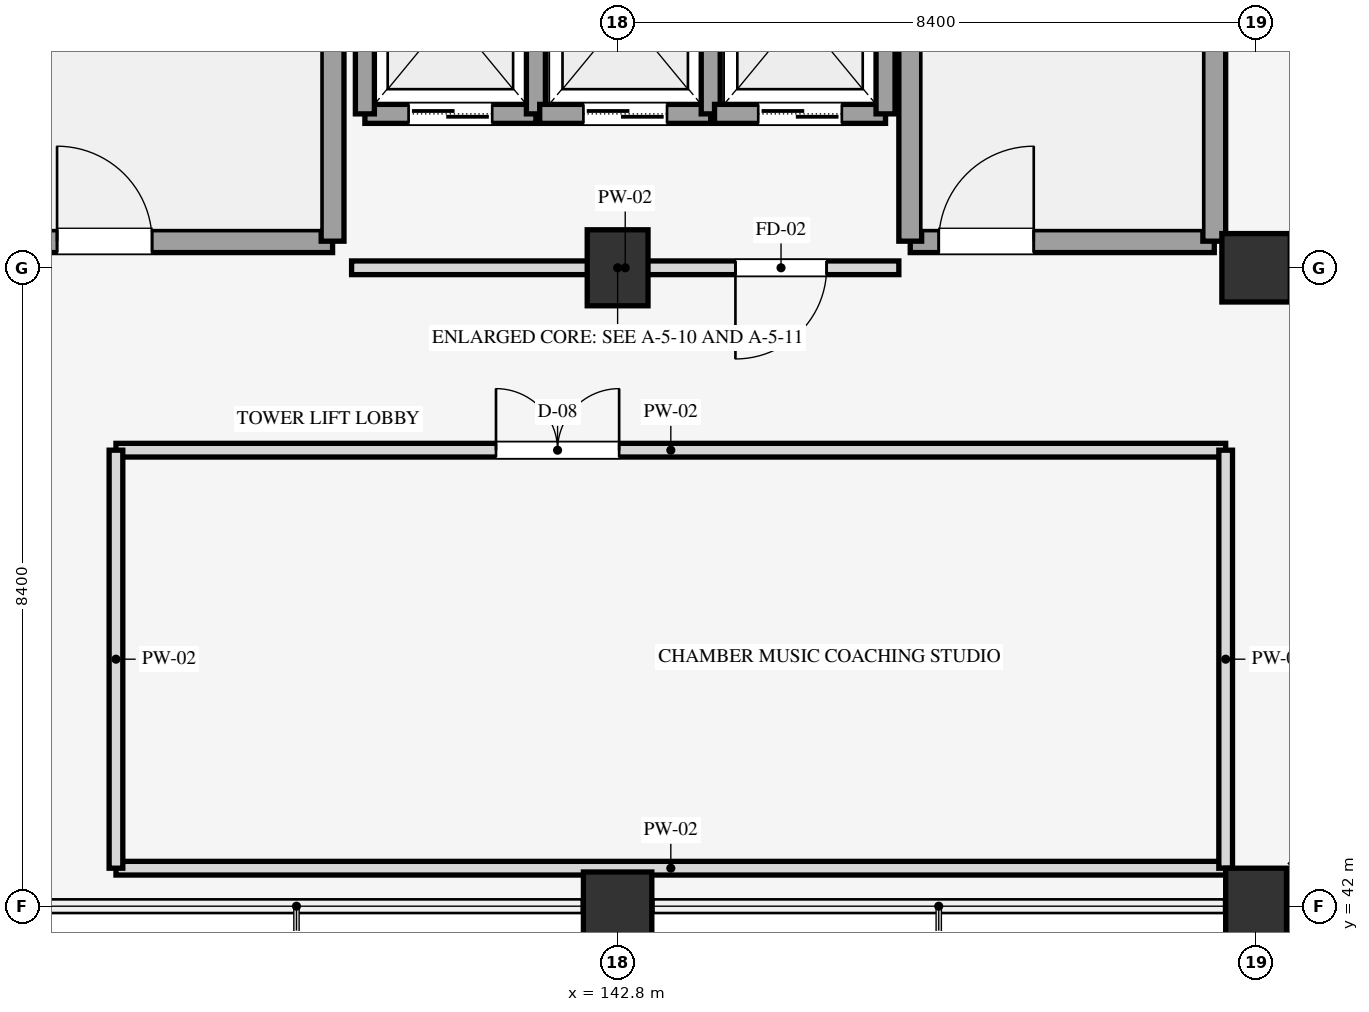
"""IFC4 building model, lengths in metres.
Left out: names, types, materials, properties, quantities, classifications, styles, units other than length and angle.
Written with IfcOpenShell. Run it as: python <this file> out.ifc"""

import sys

from ifc_helpers import new_model, si_unit, direction, frame, frame_2d, origin, origin_2d, place, context, subcontext, project, spatial, rectangle, extrude, element, fill, save


model = new_model("IFC4")
c1 = context("Model", 3, precision=1e-05, world=origin(), true_north=direction((0.0, 1.0)))
c2 = subcontext(c1, "Body", "Model", "MODEL_VIEW")
j1 = project(units=[si_unit("LENGTHUNIT", "METRE"), si_unit("PLANEANGLEUNIT", "RADIAN")], contexts=[c1])
p1 = place(None, origin())
s1 = spatial("IfcSite", under=j1, at=p1, CompositionType="ELEMENT")
p2 = place(p1, origin())
s2 = spatial("IfcBuilding", under=s1, at=p2, CompositionType="ELEMENT")
p3 = place(p2, frame((0.0, 0.0, 65.7)))
s3 = spatial("IfcBuildingStorey", under=s2, at=p3, CompositionType="ELEMENT", Elevation=65.7)
p4 = place(p3, frame((142.8, 42.0, 0.0), z_axis=(0.0, 0.0, 1.0), x_axis=(1.0, 0.0, 0.0)))
e1 = element("IfcColumn", 1, at=p4, inside=s3, PredefinedType="COLUMN", context=c2, shape_type="SweptSolid", body=[
    extrude(rectangle(XDim=0.9, YDim=0.9, at=origin_2d()), origin(), (0.0, 0.0, 1.0), 4.2),
])
for number, where, z_axis, x_axis in (
    (2, (142.8, 50.4, 0.0), (0.0, 0.0, 1.0), (1.0, 0.0, 0.0)),
    (3, (151.2, 42.0, 0.0), (0.0, 0.0, 1.0), (1.0, 0.0, 0.0)),
):
    element("IfcColumn", number, at=place(p3, frame(where, z_axis=z_axis, x_axis=x_axis)), inside=s3, PredefinedType="COLUMN", context=c2, shape_type="SweptSolid", body=[
        extrude(rectangle(XDim=0.8, YDim=1.0, at=origin_2d()), origin(), (0.0, 0.0, 1.0), 4.2),
    ])
p5 = place(p3, frame((151.2, 50.4, 0.0), z_axis=(0.0, 0.0, 1.0), x_axis=(1.0, 0.0, 0.0)))
e4 = element("IfcColumn", 4, at=p5, inside=s3, PredefinedType="COLUMN", context=c2, shape_type="SweptSolid", body=[
    extrude(rectangle(XDim=0.9, YDim=0.9, at=origin_2d()), origin(), (0.0, 0.0, 1.0), 4.2),
])
p6 = place(p3, frame((135.05, 50.75, 0.0), z_axis=(0.0, 0.0, 1.0), x_axis=(1.0, 0.0, 0.0)))
e5 = element("IfcWall", 5, at=p6, inside=s3, PredefinedType="SHEAR", context=c2, shape_type="SweptSolid", body=[
    extrude(rectangle(XDim=4.0, YDim=0.3, at=frame_2d((2.0, 0.0))), origin(), (0.0, 0.0, 1.0), 4.2),
])
p7 = place(p6, frame((0.375, 0.0, 0.0)))
e6 = element("IfcOpeningElement", 6, at=p7, cuts=e5, PredefinedType="OPENING", context=c2, shape_type="SweptSolid", body=[
    extrude(rectangle(XDim=1.25, YDim=2.15, at=frame_2d((0.625, 1.075))), frame((0.0, 0.16, 0.0), z_axis=(0.0, -1.0, 0.0), x_axis=(1.0, 0.0, 0.0)), (0.0, 0.0, 1.0), 0.32),
])
p8 = place(p3, frame((139.05, 50.75, 0.0), z_axis=(0.0, 0.0, 1.0), x_axis=(0.0, 1.0, 0.0)))
e7 = element("IfcWall", 7, at=p8, inside=s3, PredefinedType="SHEAR", context=c2, shape_type="SweptSolid", body=[
    extrude(rectangle(XDim=14.3, YDim=0.3, at=frame_2d((7.15, 0.0))), origin(), (0.0, 0.0, 1.0), 4.2),
])
p9 = place(p3, frame((137.25, 52.4, 0.0), z_axis=(0.0, 0.0, 1.0), x_axis=(0.0, 1.0, 0.0)))
e8 = element("IfcWall", 8, at=p9, inside=s3, PredefinedType="SHEAR", context=c2, shape_type="SweptSolid", body=[
    extrude(rectangle(XDim=11.0, YDim=0.2, at=frame_2d((5.5, 0.0))), origin(), (0.0, 0.0, 1.0), 4.2),
])
p10 = place(p3, frame((146.65, 50.75, 0.0), z_axis=(0.0, 0.0, 1.0), x_axis=(1.0, 0.0, 0.0)))
e9 = element("IfcWall", 9, at=p10, inside=s3, PredefinedType="SHEAR", context=c2, shape_type="SweptSolid", body=[
    extrude(rectangle(XDim=4.0, YDim=0.3, at=frame_2d((2.0, 0.0))), origin(), (0.0, 0.0, 1.0), 4.2),
])
p11 = place(p10, frame((0.375, 0.0, 0.0)))
e10 = element("IfcOpeningElement", 10, at=p11, cuts=e9, PredefinedType="OPENING", context=c2, shape_type="SweptSolid", body=[
    extrude(rectangle(XDim=1.25, YDim=2.15, at=frame_2d((0.625, 1.075))), frame((0.0, 0.16, 0.0), z_axis=(0.0, -1.0, 0.0), x_axis=(1.0, 0.0, 0.0)), (0.0, 0.0, 1.0), 0.32),
])
for number, where, z_axis, x_axis in (
    (11, (146.65, 50.75, 0.0), (0.0, 0.0, 1.0), (0.0, 1.0, 0.0)),
    (12, (150.65, 50.75, 0.0), (0.0, 0.0, 1.0), (0.0, 1.0, 0.0)),
):
    element("IfcWall", number, at=place(p3, frame(where, z_axis=z_axis, x_axis=x_axis)), inside=s3, PredefinedType="SHEAR", context=c2, shape_type="SweptSolid", body=[
        extrude(rectangle(XDim=14.3, YDim=0.3, at=frame_2d((7.15, 0.0))), origin(), (0.0, 0.0, 1.0), 4.2),
    ])
p12 = place(p3, frame((148.85, 52.4, 0.0), z_axis=(0.0, 0.0, 1.0), x_axis=(0.0, 1.0, 0.0)))
e13 = element("IfcWall", 13, at=p12, inside=s3, PredefinedType="SHEAR", context=c2, shape_type="SweptSolid", body=[
    extrude(rectangle(XDim=11.0, YDim=0.2, at=frame_2d((5.5, 0.0))), origin(), (0.0, 0.0, 1.0), 4.2),
])
p13 = place(p3, frame((139.475, 52.425, 0.0), z_axis=(0.0, 0.0, 1.0), x_axis=(1.0, 0.0, 0.0)))
e14 = element("IfcWall", 14, at=p13, inside=s3, PredefinedType="SHEAR", context=c2, shape_type="SweptSolid", body=[
    extrude(rectangle(XDim=2.25, YDim=0.25, at=frame_2d((1.125, 0.0))), origin(), (0.0, 0.0, 1.0), 3.96),
])
p14 = place(p13, frame((0.575, 0.0, 0.0)))
e15 = element("IfcOpeningElement", 15, at=p14, cuts=e14, PredefinedType="OPENING", context=c2, shape_type="SweptSolid", body=[
    extrude(rectangle(XDim=1.1, YDim=2.15, at=frame_2d((0.55, 1.075))), frame((0.0, 0.135, 0.0), z_axis=(0.0, -1.0, 0.0), x_axis=(1.0, 0.0, 0.0)), (0.0, 0.0, 1.0), 0.27),
])
for number, where, z_axis, x_axis in (
    (16, (139.475, 52.425, 0.0), (0.0, 0.0, 1.0), (0.0, 1.0, 0.0)),
    (17, (141.725, 52.425, 0.0), (0.0, 0.0, 1.0), (0.0, 1.0, 0.0)),
):
    element("IfcWall", number, at=place(p3, frame(where, z_axis=z_axis, x_axis=x_axis)), inside=s3, PredefinedType="SHEAR", context=c2, shape_type="SweptSolid", body=[
        extrude(rectangle(XDim=2.65, YDim=0.25, at=frame_2d((1.325, 0.0))), origin(), (0.0, 0.0, 1.0), 3.96),
    ])
p15 = place(p3, frame((141.775, 52.425, 0.0), z_axis=(0.0, 0.0, 1.0), x_axis=(1.0, 0.0, 0.0)))
e18 = element("IfcWall", 18, at=p15, inside=s3, PredefinedType="SHEAR", context=c2, shape_type="SweptSolid", body=[
    extrude(rectangle(XDim=2.25, YDim=0.25, at=frame_2d((1.125, 0.0))), origin(), (0.0, 0.0, 1.0), 3.96),
])
p16 = place(p15, frame((0.575, 0.0, 0.0)))
e19 = element("IfcOpeningElement", 19, at=p16, cuts=e18, PredefinedType="OPENING", context=c2, shape_type="SweptSolid", body=[
    extrude(rectangle(XDim=1.1, YDim=2.15, at=frame_2d((0.55, 1.075))), frame((0.0, 0.135, 0.0), z_axis=(0.0, -1.0, 0.0), x_axis=(1.0, 0.0, 0.0)), (0.0, 0.0, 1.0), 0.27),
])
p17 = place(p3, frame((144.025, 52.425, 0.0), z_axis=(0.0, 0.0, 1.0), x_axis=(0.0, 1.0, 0.0)))
e20 = element("IfcWall", 20, at=p17, inside=s3, PredefinedType="SHEAR", context=c2, shape_type="SweptSolid", body=[
    extrude(rectangle(XDim=2.65, YDim=0.25, at=frame_2d((1.325, 0.0))), origin(), (0.0, 0.0, 1.0), 3.96),
])
p18 = place(p3, frame((144.075, 52.425, 0.0), z_axis=(0.0, 0.0, 1.0), x_axis=(1.0, 0.0, 0.0)))
e21 = element("IfcWall", 21, at=p18, inside=s3, PredefinedType="SHEAR", context=c2, shape_type="SweptSolid", body=[
    extrude(rectangle(XDim=2.25, YDim=0.25, at=frame_2d((1.125, 0.0))), origin(), (0.0, 0.0, 1.0), 3.96),
])
p19 = place(p18, frame((0.575, 0.0, 0.0)))
e22 = element("IfcOpeningElement", 22, at=p19, cuts=e21, PredefinedType="OPENING", context=c2, shape_type="SweptSolid", body=[
    extrude(rectangle(XDim=1.1, YDim=2.15, at=frame_2d((0.55, 1.075))), frame((0.0, 0.135, 0.0), z_axis=(0.0, -1.0, 0.0), x_axis=(1.0, 0.0, 0.0)), (0.0, 0.0, 1.0), 0.27),
])
p20 = place(p3, frame((146.325, 52.425, 0.0), z_axis=(0.0, 0.0, 1.0), x_axis=(0.0, 1.0, 0.0)))
e23 = element("IfcWall", 23, at=p20, inside=s3, PredefinedType="SHEAR", context=c2, shape_type="SweptSolid", body=[
    extrude(rectangle(XDim=2.65, YDim=0.25, at=frame_2d((1.325, 0.0))), origin(), (0.0, 0.0, 1.0), 3.96),
])
p21 = place(p3, frame((139.3, 50.4, 0.0), z_axis=(0.0, 0.0, 1.0), x_axis=(1.0, 0.0, 0.0)))
e24 = element("IfcWall", 24, at=p21, inside=s3, PredefinedType="PARTITIONING", context=c2, shape_type="SweptSolid", body=[
    extrude(rectangle(XDim=7.2, YDim=0.18, at=frame_2d((3.6, 0.0))), origin(), (0.0, 0.0, 1.0), 3.24),
])
p22 = place(p21, frame((5.05, 0.0, 0.0)))
e25 = element("IfcOpeningElement", 25, at=p22, cuts=e24, PredefinedType="OPENING", context=c2, shape_type="SweptSolid", body=[
    extrude(rectangle(XDim=1.2, YDim=2.15, at=frame_2d((0.6, 1.075))), frame((0.0, 0.1, 0.0), z_axis=(0.0, -1.0, 0.0), x_axis=(1.0, 0.0, 0.0)), (0.0, 0.0, 1.0), 0.2),
])
p23 = place(p3, frame((136.2, 42.5, 0.0), z_axis=(0.0, 0.0, 1.0), x_axis=(1.0, 0.0, 0.0)))
e26 = element("IfcWall", 26, at=p23, inside=s3, PredefinedType="PARTITIONING", context=c2, shape_type="SweptSolid", body=[
    extrude(rectangle(XDim=14.6, YDim=0.18, at=frame_2d((7.3, 0.0))), origin(), (0.0, 0.0, 1.0), 3.24),
])
p24 = place(p3, frame((136.2, 48.0, 0.0), z_axis=(0.0, 0.0, 1.0), x_axis=(1.0, 0.0, 0.0)))
e27 = element("IfcWall", 27, at=p24, inside=s3, PredefinedType="PARTITIONING", context=c2, shape_type="SweptSolid", body=[
    extrude(rectangle(XDim=14.6, YDim=0.18, at=frame_2d((7.3, 0.0))), origin(), (0.0, 0.0, 1.0), 3.24),
])
p25 = place(p24, frame((5.0, 0.0, 0.0)))
e28 = element("IfcOpeningElement", 28, at=p25, cuts=e27, PredefinedType="OPENING", context=c2, shape_type="SweptSolid", body=[
    extrude(rectangle(XDim=1.62, YDim=2.22, at=frame_2d((0.81, 1.11))), frame((0.0, 0.1, 0.0), z_axis=(0.0, -1.0, 0.0), x_axis=(1.0, 0.0, 0.0)), (0.0, 0.0, 1.0), 0.2),
])
for number, where, z_axis, x_axis in (
    (29, (136.2, 42.5, 0.0), (0.0, 0.0, 1.0), (0.0, 1.0, 0.0)),
    (30, (150.8, 42.5, 0.0), (0.0, 0.0, 1.0), (0.0, 1.0, 0.0)),
):
    element("IfcWall", number, at=place(p3, frame(where, z_axis=z_axis, x_axis=x_axis)), inside=s3, PredefinedType="PARTITIONING", context=c2, shape_type="SweptSolid", body=[
        extrude(rectangle(XDim=5.5, YDim=0.18, at=frame_2d((2.75, 0.0))), origin(), (0.0, 0.0, 1.0), 3.24),
    ])
p26 = place(p7, origin())
e31 = element("IfcDoor", 31, at=p26, inside=s3, OperationType="SINGLE_SWING_LEFT", PredefinedType="DOOR", context=c2, shape_type="SweptSolid", body=[
    extrude(rectangle(XDim=1.25, YDim=2.15, at=frame_2d((0.625, 1.075))), frame((0.0, 0.025, 0.0), z_axis=(0.0, -1.0, 0.0), x_axis=(1.0, 0.0, 0.0)), (0.0, 0.0, 1.0), 0.05),
])
fill(e6, e31)
p27 = place(p11, origin())
e32 = element("IfcDoor", 32, at=p27, inside=s3, OperationType="SINGLE_SWING_RIGHT", PredefinedType="DOOR", context=c2, shape_type="SweptSolid", body=[
    extrude(rectangle(XDim=1.25, YDim=2.15, at=frame_2d((0.625, 1.075))), frame((0.0, 0.025, 0.0), z_axis=(0.0, -1.0, 0.0), x_axis=(1.0, 0.0, 0.0)), (0.0, 0.0, 1.0), 0.05),
])
fill(e10, e32)
p28 = place(p14, origin())
e33 = element("IfcDoor", 33, at=p28, inside=s3, OperationType="DOUBLE_DOOR_SLIDING", PredefinedType="DOOR", context=c2, shape_type="SweptSolid", body=[
    extrude(rectangle(XDim=1.1, YDim=2.15, at=frame_2d((0.55, 1.075))), frame((0.0, 0.025, 0.0), z_axis=(0.0, -1.0, 0.0), x_axis=(1.0, 0.0, 0.0)), (0.0, 0.0, 1.0), 0.05),
])
fill(e15, e33)
p29 = place(p16, origin())
e34 = element("IfcDoor", 34, at=p29, inside=s3, OperationType="DOUBLE_DOOR_SLIDING", PredefinedType="DOOR", context=c2, shape_type="SweptSolid", body=[
    extrude(rectangle(XDim=1.1, YDim=2.15, at=frame_2d((0.55, 1.075))), frame((0.0, 0.025, 0.0), z_axis=(0.0, -1.0, 0.0), x_axis=(1.0, 0.0, 0.0)), (0.0, 0.0, 1.0), 0.05),
])
fill(e19, e34)
p30 = place(p19, origin())
e35 = element("IfcDoor", 35, at=p30, inside=s3, OperationType="DOUBLE_DOOR_SLIDING", PredefinedType="DOOR", context=c2, shape_type="SweptSolid", body=[
    extrude(rectangle(XDim=1.1, YDim=2.15, at=frame_2d((0.55, 1.075))), frame((0.0, 0.025, 0.0), z_axis=(0.0, -1.0, 0.0), x_axis=(1.0, 0.0, 0.0)), (0.0, 0.0, 1.0), 0.05),
])
fill(e22, e35)
p31 = place(p22, frame((1.2, 0.0, 0.0), z_axis=(0.0, 0.0, 1.0), x_axis=(-1.0, 0.0, 0.0)))
e36 = element("IfcDoor", 36, at=p31, inside=s3, OperationType="SINGLE_SWING_RIGHT", PredefinedType="DOOR", context=c2, shape_type="SweptSolid", body=[
    extrude(rectangle(XDim=1.2, YDim=2.15, at=frame_2d((0.6, 1.075))), frame((0.0, 0.025, 0.0), z_axis=(0.0, -1.0, 0.0), x_axis=(1.0, 0.0, 0.0)), (0.0, 0.0, 1.0), 0.05),
])
fill(e25, e36)
p32 = place(p25, origin())
e37 = element("IfcDoor", 37, at=p32, inside=s3, OperationType="DOUBLE_DOOR_SINGLE_SWING", PredefinedType="DOOR", context=c2, shape_type="SweptSolid", body=[
    extrude(rectangle(XDim=1.62, YDim=2.22, at=frame_2d((0.81, 1.11))), frame((0.0, 0.025, 0.0), z_axis=(0.0, -1.0, 0.0), x_axis=(1.0, 0.0, 0.0)), (0.0, 0.0, 1.0), 0.05),
])
fill(e28, e37)
save(model, sys.argv[1])
